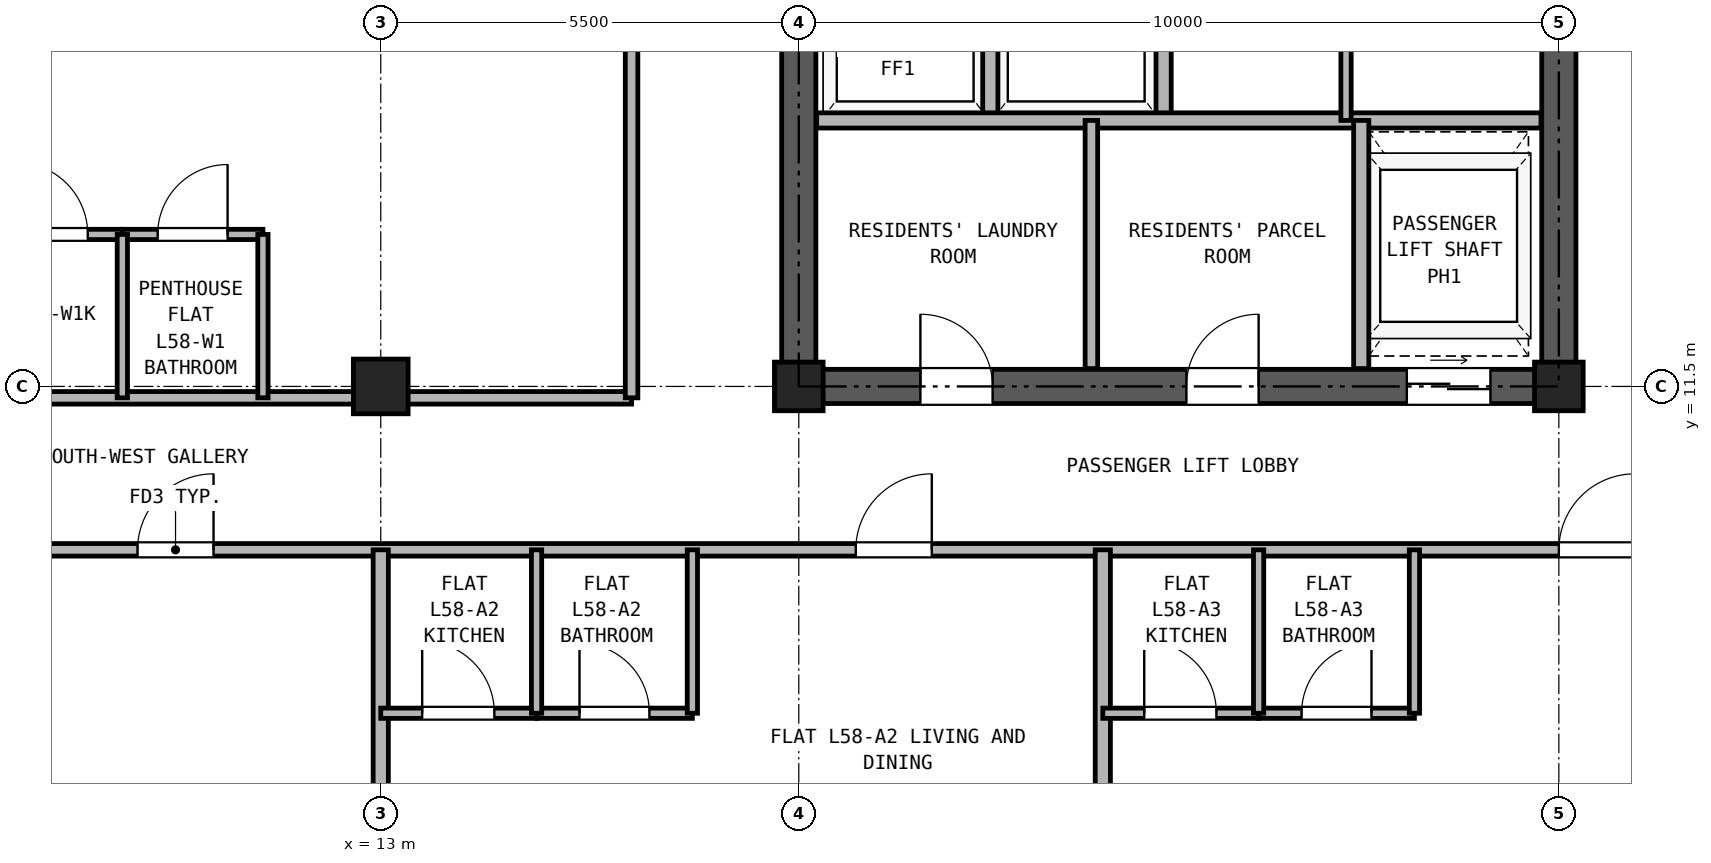
"""IFC4 building model, lengths in metres.
Left out: names, types, materials, properties, quantities, classifications, styles, units other than length and angle.
Written with IfcOpenShell. Run it as: python <this file> out.ifc"""

import sys

from ifc_helpers import new_model, si_unit, direction, frame, frame_2d, origin, origin_2d, place, context, subcontext, project, spatial, rectangle, hollow_rectangle, extrude, source, transform, mapped, element, fill, save


model = new_model("IFC4")
c1 = context("Model", 3, precision=1e-05, world=origin(), true_north=direction((0.0, 1.0)))
c2 = subcontext(c1, "Body", "Model", "MODEL_VIEW")
j1 = project(units=[si_unit("LENGTHUNIT", "METRE"), si_unit("PLANEANGLEUNIT", "RADIAN")], contexts=[c1])
p1 = place(None, origin())
s1 = spatial("IfcSite", under=j1, at=p1, CompositionType="ELEMENT")
p2 = place(p1, origin())
s2 = spatial("IfcBuilding", under=s1, at=p2, CompositionType="ELEMENT")
p3 = place(p2, frame((0.0, 0.0, 206.0)))
s3 = spatial("IfcBuildingStorey", under=s2, at=p3, CompositionType="ELEMENT", Elevation=206.0)
m1 = source(origin(), c2, "Body", "SweptSolid", [
    extrude(hollow_rectangle(XDim=0.72, YDim=0.72, WallThickness=0.04, at=origin_2d()), origin(), (0.0, 0.0, 1.0), 2.95),
])
p4 = place(p3, frame((13.0, 11.5, 0.0), z_axis=(0.0, 0.0, 1.0), x_axis=(1.0, 0.0, 0.0)))
e1 = element("IfcColumn", 1, at=p4, inside=s3, PredefinedType="COLUMN", context=c2, shape_type="MappedRepresentation", body=[
    mapped(m1, transform((0.0, 0.0, 0.0), x_axis=(1.0, 0.0, 0.0), y_axis=(0.0, 1.0, 0.0), z_axis=(0.0, 0.0, 1.0), scale=1.0)),
])
m2 = source(origin(), c2, "Body", "SweptSolid", [
    extrude(hollow_rectangle(XDim=0.64, YDim=0.64, WallThickness=0.035, at=origin_2d()), origin(), (0.0, 0.0, 1.0), 2.95),
])
for number, where, z_axis, x_axis in (
    (2, (18.5, 11.5, 0.0), (0.0, 0.0, 1.0), (1.0, 0.0, 0.0)),
    (3, (28.5, 11.5, 0.0), (0.0, 0.0, 1.0), (1.0, 0.0, 0.0)),
):
    element("IfcColumn", number, at=place(p3, frame(where, z_axis=z_axis, x_axis=x_axis)), inside=s3, PredefinedType="COLUMN", context=c2, shape_type="MappedRepresentation", body=[
        mapped(m2, transform((0.0, 0.0, 0.0), x_axis=(1.0, 0.0, 0.0), y_axis=(0.0, 1.0, 0.0), z_axis=(0.0, 0.0, 1.0), scale=1.0)),
    ])
p5 = place(p3, frame((18.275, 11.5, 0.0), z_axis=(0.0, 0.0, 1.0), x_axis=(1.0, 0.0, 0.0)))
e4 = element("IfcWall", 4, at=p5, inside=s3, PredefinedType="SHEAR", context=c2, shape_type="SweptSolid", body=[
    extrude(rectangle(XDim=10.45, YDim=0.45, at=frame_2d((5.225, 0.0))), origin(), (0.0, 0.0, 1.0), 2.95),
])
p6 = place(p5, frame((1.825, 0.0, 0.0)))
e5 = element("IfcOpeningElement", 5, at=p6, cuts=e4, PredefinedType="OPENING", context=c2, shape_type="SweptSolid", body=[
    extrude(rectangle(XDim=0.95, YDim=2.15, at=frame_2d((0.475, 1.075))), frame((0.0, 0.235, 0.0), z_axis=(0.0, -1.0, 0.0), x_axis=(1.0, 0.0, 0.0)), (0.0, 0.0, 1.0), 0.47),
])
p7 = place(p5, frame((5.325, 0.0, 0.0)))
e6 = element("IfcOpeningElement", 6, at=p7, cuts=e4, PredefinedType="OPENING", context=c2, shape_type="SweptSolid", body=[
    extrude(rectangle(XDim=0.95, YDim=2.15, at=frame_2d((0.475, 1.075))), frame((0.0, 0.235, 0.0), z_axis=(0.0, -1.0, 0.0), x_axis=(1.0, 0.0, 0.0)), (0.0, 0.0, 1.0), 0.47),
])
p8 = place(p5, frame((8.225, 0.0, 0.0)))
e7 = element("IfcOpeningElement", 7, at=p8, cuts=e4, PredefinedType="OPENING", context=c2, shape_type="SweptSolid", body=[
    extrude(rectangle(XDim=1.1, YDim=2.25, at=frame_2d((0.55, 1.125))), frame((0.0, 0.235, 0.0), z_axis=(0.0, -1.0, 0.0), x_axis=(1.0, 0.0, 0.0)), (0.0, 0.0, 1.0), 0.47),
])
p9 = place(p3, frame((18.5, 11.725, 0.0), z_axis=(0.0, 0.0, 1.0), x_axis=(0.0, 1.0, 0.0)))
e8 = element("IfcWall", 8, at=p9, inside=s3, PredefinedType="SHEAR", context=c2, shape_type="SweptSolid", body=[
    extrude(rectangle(XDim=16.8, YDim=0.45, at=frame_2d((8.4, 0.0))), origin(), (0.0, 0.0, 1.0), 2.95),
])
p10 = place(p9, frame((7.425, 0.0, 0.0)))
e9 = element("IfcOpeningElement", 9, at=p10, cuts=e8, PredefinedType="OPENING", context=c2, shape_type="SweptSolid", body=[
    extrude(rectangle(XDim=1.15, YDim=2.2, at=frame_2d((0.575, 1.1))), frame((0.0, 0.235, 0.0), z_axis=(0.0, -1.0, 0.0), x_axis=(1.0, 0.0, 0.0)), (0.0, 0.0, 1.0), 0.47),
])
p11 = place(p3, frame((28.5, 11.725, 0.0), z_axis=(0.0, 0.0, 1.0), x_axis=(0.0, 1.0, 0.0)))
e10 = element("IfcWall", 10, at=p11, inside=s3, PredefinedType="SHEAR", context=c2, shape_type="SweptSolid", body=[
    extrude(rectangle(XDim=16.8, YDim=0.45, at=frame_2d((8.4, 0.0))), origin(), (0.0, 0.0, 1.0), 2.95),
])
p12 = place(p11, frame((7.425, 0.0, 0.0)))
e11 = element("IfcOpeningElement", 11, at=p12, cuts=e10, PredefinedType="OPENING", context=c2, shape_type="SweptSolid", body=[
    extrude(rectangle(XDim=1.15, YDim=2.2, at=frame_2d((0.575, 1.1))), frame((0.0, 0.235, 0.0), z_axis=(0.0, -1.0, 0.0), x_axis=(1.0, 0.0, 0.0)), (0.0, 0.0, 1.0), 0.47),
])
for number, where, z_axis, x_axis in (
    (12, (21.02, 15.0, 0.0), (0.0, 0.0, 1.0), (0.0, 1.0, 0.0)),
    (13, (23.3, 15.0, 0.0), (0.0, 0.0, 1.0), (0.0, 1.0, 0.0)),
):
    element("IfcWall", number, at=place(p3, frame(where, z_axis=z_axis, x_axis=x_axis)), inside=s3, PredefinedType="PARTITIONING", context=c2, shape_type="SweptSolid", body=[
        extrude(rectangle(XDim=3.0, YDim=0.2, at=frame_2d((1.5, 0.0))), origin(), (0.0, 0.0, 1.0), 2.95),
    ])
p13 = place(p3, frame((18.735, 15.0, 0.0), z_axis=(0.0, 0.0, 1.0), x_axis=(1.0, 0.0, 0.0)))
e14 = element("IfcWall", 14, at=p13, inside=s3, PredefinedType="PARTITIONING", context=c2, shape_type="SweptSolid", body=[
    extrude(rectangle(XDim=9.53, YDim=0.2, at=frame_2d((4.765, 0.0))), origin(), (0.0, 0.0, 1.0), 2.95),
])
p14 = place(p3, frame((25.7, 15.0, 0.0), z_axis=(0.0, 0.0, 1.0), x_axis=(0.0, 1.0, 0.0)))
e15 = element("IfcWall", 15, at=p14, inside=s3, PredefinedType="PARTITIONING", context=c2, shape_type="SweptSolid", body=[
    extrude(rectangle(XDim=3.0, YDim=0.135, at=frame_2d((1.5, 0.0))), origin(), (0.0, 0.0, 1.0), 2.95),
])
p15 = place(p3, frame((22.35, 11.735, 0.0), z_axis=(0.0, 0.0, 1.0), x_axis=(0.0, 1.0, 0.0)))
e16 = element("IfcWall", 16, at=p15, inside=s3, PredefinedType="PARTITIONING", context=c2, shape_type="SweptSolid", body=[
    extrude(rectangle(XDim=3.265, YDim=0.165, at=frame_2d((1.632, 0.0))), origin(), (0.0, 0.0, 1.0), 2.95),
])
p16 = place(p3, frame((25.9, 11.735, 0.0), z_axis=(0.0, 0.0, 1.0), x_axis=(0.0, 1.0, 0.0)))
e17 = element("IfcWall", 17, at=p16, inside=s3, PredefinedType="PARTITIONING", context=c2, shape_type="SweptSolid", body=[
    extrude(rectangle(XDim=3.265, YDim=0.2, at=frame_2d((1.632, 0.0))), origin(), (0.0, 0.0, 1.0), 2.95),
])
p17 = place(p3, frame((0.16, 9.35, 0.0), z_axis=(0.0, 0.0, 1.0), x_axis=(1.0, 0.0, 0.0)))
e18 = element("IfcWall", 18, at=p17, inside=s3, PredefinedType="PARTITIONING", context=c2, shape_type="SweptSolid", body=[
    extrude(rectangle(XDim=41.48, YDim=0.165, at=frame_2d((20.74, 0.0))), origin(), (0.0, 0.0, 1.0), 2.95),
])
p18 = place(p17, frame((9.64, 0.0, 0.0)))
e19 = element("IfcOpeningElement", 19, at=p18, cuts=e18, PredefinedType="OPENING", context=c2, shape_type="SweptSolid", body=[
    extrude(rectangle(XDim=1.0, YDim=2.15, at=frame_2d((0.5, 1.075))), frame((0.0, 0.093, 0.0), z_axis=(0.0, -1.0, 0.0), x_axis=(1.0, 0.0, 0.0)), (0.0, 0.0, 1.0), 0.185),
])
p19 = place(p17, frame((19.09, 0.0, 0.0)))
e20 = element("IfcOpeningElement", 20, at=p19, cuts=e18, PredefinedType="OPENING", context=c2, shape_type="SweptSolid", body=[
    extrude(rectangle(XDim=1.0, YDim=2.15, at=frame_2d((0.5, 1.075))), frame((0.0, 0.093, 0.0), z_axis=(0.0, -1.0, 0.0), x_axis=(1.0, 0.0, 0.0)), (0.0, 0.0, 1.0), 0.185),
])
p20 = place(p17, frame((28.34, 0.0, 0.0)))
e21 = element("IfcOpeningElement", 21, at=p20, cuts=e18, PredefinedType="OPENING", context=c2, shape_type="SweptSolid", body=[
    extrude(rectangle(XDim=1.0, YDim=2.15, at=frame_2d((0.5, 1.075))), frame((0.0, 0.093, 0.0), z_axis=(0.0, -1.0, 0.0), x_axis=(1.0, 0.0, 0.0)), (0.0, 0.0, 1.0), 0.185),
])
p21 = place(p17, frame((32.865, 0.0, 0.0)))
e22 = element("IfcOpeningElement", 22, at=p21, cuts=e18, PredefinedType="OPENING", context=c2, shape_type="SweptSolid", body=[
    extrude(rectangle(XDim=1.0, YDim=2.15, at=frame_2d((0.5, 1.075))), frame((0.0, 0.093, 0.0), z_axis=(0.0, -1.0, 0.0), x_axis=(1.0, 0.0, 0.0)), (0.0, 0.0, 1.0), 0.185),
])
p22 = place(p3, frame((7.6, 11.35, 0.0), z_axis=(0.0, 0.0, 1.0), x_axis=(1.0, 0.0, 0.0)))
e23 = element("IfcWall", 23, at=p22, inside=s3, PredefinedType="PARTITIONING", context=c2, shape_type="SweptSolid", body=[
    extrude(rectangle(XDim=8.7, YDim=0.165, at=frame_2d((4.35, 0.0))), origin(), (0.0, 0.0, 1.0), 2.323),
])
p23 = place(p3, frame((16.3, 11.35, 0.0), z_axis=(0.0, 0.0, 1.0), x_axis=(0.0, 1.0, 0.0)))
e24 = element("IfcWall", 24, at=p23, inside=s3, PredefinedType="PARTITIONING", context=c2, shape_type="SweptSolid", body=[
    extrude(rectangle(XDim=23.79, YDim=0.165, at=frame_2d((11.895, 0.0))), origin(), (0.0, 0.0, 1.0), 2.95),
])
p24 = place(p23, frame((4.825, 0.0, 0.0)))
e25 = element("IfcOpeningElement", 25, at=p24, cuts=e24, PredefinedType="OPENING", context=c2, shape_type="SweptSolid", body=[
    extrude(rectangle(XDim=1.0, YDim=2.15, at=frame_2d((0.5, 1.075))), frame((0.0, 0.093, 0.0), z_axis=(0.0, -1.0, 0.0), x_axis=(1.0, 0.0, 0.0)), (0.0, 0.0, 1.0), 0.185),
])
p25 = place(p23, frame((14.475, 0.0, 0.0)))
e26 = element("IfcOpeningElement", 26, at=p25, cuts=e24, PredefinedType="OPENING", context=c2, shape_type="SweptSolid", body=[
    extrude(rectangle(XDim=1.0, YDim=2.15, at=frame_2d((0.5, 1.075))), frame((0.0, 0.093, 0.0), z_axis=(0.0, -1.0, 0.0), x_axis=(1.0, 0.0, 0.0)), (0.0, 0.0, 1.0), 0.185),
])
p26 = place(p3, frame((13.0, 0.16, 0.0), z_axis=(0.0, 0.0, 1.0), x_axis=(0.0, 1.0, 0.0)))
e27 = element("IfcWall", 27, at=p26, inside=s3, PredefinedType="PARTITIONING", context=c2, shape_type="SweptSolid", body=[
    extrude(rectangle(XDim=9.19, YDim=0.2, at=frame_2d((4.595, 0.0))), origin(), (0.0, 0.0, 1.0), 2.323),
])
p27 = place(p3, frame((13.0, 7.2, 0.0), z_axis=(0.0, 0.0, 1.0), x_axis=(1.0, 0.0, 0.0)))
e28 = element("IfcWall", 28, at=p27, inside=s3, PredefinedType="PARTITIONING", context=c2, shape_type="SweptSolid", body=[
    extrude(rectangle(XDim=2.05, YDim=0.135, at=frame_2d((1.025, 0.0))), origin(), (0.0, 0.0, 1.0), 2.95),
])
p28 = place(p27, frame((0.545, 0.0, 0.0)))
e29 = element("IfcOpeningElement", 29, at=p28, cuts=e28, PredefinedType="OPENING", context=c2, shape_type="SweptSolid", body=[
    extrude(rectangle(XDim=0.95, YDim=2.15, at=frame_2d((0.475, 1.075))), frame((0.0, 0.077, 0.0), z_axis=(0.0, -1.0, 0.0), x_axis=(1.0, 0.0, 0.0)), (0.0, 0.0, 1.0), 0.155),
])
p29 = place(p3, frame((15.05, 7.2, 0.0), z_axis=(0.0, 0.0, 1.0), x_axis=(1.0, 0.0, 0.0)))
e30 = element("IfcWall", 30, at=p29, inside=s3, PredefinedType="PARTITIONING", context=c2, shape_type="SweptSolid", body=[
    extrude(rectangle(XDim=2.05, YDim=0.135, at=frame_2d((1.025, 0.0))), origin(), (0.0, 0.0, 1.0), 2.95),
])
p30 = place(p29, frame((0.565, 0.0, 0.0)))
e31 = element("IfcOpeningElement", 31, at=p30, cuts=e30, PredefinedType="OPENING", context=c2, shape_type="SweptSolid", body=[
    extrude(rectangle(XDim=0.92, YDim=2.1, at=frame_2d((0.46, 1.05))), frame((0.0, 0.077, 0.0), z_axis=(0.0, -1.0, 0.0), x_axis=(1.0, 0.0, 0.0)), (0.0, 0.0, 1.0), 0.155),
])
for number, where, z_axis, x_axis in (
    (32, (15.05, 7.2, 0.0), (0.0, 0.0, 1.0), (0.0, 1.0, 0.0)),
    (33, (17.1, 7.2, 0.0), (0.0, 0.0, 1.0), (0.0, 1.0, 0.0)),
):
    element("IfcWall", number, at=place(p3, frame(where, z_axis=z_axis, x_axis=x_axis)), inside=s3, PredefinedType="PARTITIONING", context=c2, shape_type="SweptSolid", body=[
        extrude(rectangle(XDim=2.15, YDim=0.135, at=frame_2d((1.075, 0.0))), origin(), (0.0, 0.0, 1.0), 2.95),
    ])
p31 = place(p3, frame((22.5, 0.16, 0.0), z_axis=(0.0, 0.0, 1.0), x_axis=(0.0, 1.0, 0.0)))
e34 = element("IfcWall", 34, at=p31, inside=s3, PredefinedType="PARTITIONING", context=c2, shape_type="SweptSolid", body=[
    extrude(rectangle(XDim=9.19, YDim=0.2, at=frame_2d((4.595, 0.0))), origin(), (0.0, 0.0, 1.0), 2.95),
])
p32 = place(p3, frame((22.5, 7.2, 0.0), z_axis=(0.0, 0.0, 1.0), x_axis=(1.0, 0.0, 0.0)))
e35 = element("IfcWall", 35, at=p32, inside=s3, PredefinedType="PARTITIONING", context=c2, shape_type="SweptSolid", body=[
    extrude(rectangle(XDim=2.05, YDim=0.135, at=frame_2d((1.025, 0.0))), origin(), (0.0, 0.0, 1.0), 2.95),
])
p33 = place(p32, frame((0.545, 0.0, 0.0)))
e36 = element("IfcOpeningElement", 36, at=p33, cuts=e35, PredefinedType="OPENING", context=c2, shape_type="SweptSolid", body=[
    extrude(rectangle(XDim=0.95, YDim=2.15, at=frame_2d((0.475, 1.075))), frame((0.0, 0.077, 0.0), z_axis=(0.0, -1.0, 0.0), x_axis=(1.0, 0.0, 0.0)), (0.0, 0.0, 1.0), 0.155),
])
p34 = place(p3, frame((24.55, 7.2, 0.0), z_axis=(0.0, 0.0, 1.0), x_axis=(1.0, 0.0, 0.0)))
e37 = element("IfcWall", 37, at=p34, inside=s3, PredefinedType="PARTITIONING", context=c2, shape_type="SweptSolid", body=[
    extrude(rectangle(XDim=2.05, YDim=0.135, at=frame_2d((1.025, 0.0))), origin(), (0.0, 0.0, 1.0), 2.95),
])
p35 = place(p34, frame((0.565, 0.0, 0.0)))
e38 = element("IfcOpeningElement", 38, at=p35, cuts=e37, PredefinedType="OPENING", context=c2, shape_type="SweptSolid", body=[
    extrude(rectangle(XDim=0.92, YDim=2.1, at=frame_2d((0.46, 1.05))), frame((0.0, 0.077, 0.0), z_axis=(0.0, -1.0, 0.0), x_axis=(1.0, 0.0, 0.0)), (0.0, 0.0, 1.0), 0.155),
])
for number, where, z_axis, x_axis in (
    (39, (24.55, 7.2, 0.0), (0.0, 0.0, 1.0), (0.0, 1.0, 0.0)),
    (40, (26.6, 7.2, 0.0), (0.0, 0.0, 1.0), (0.0, 1.0, 0.0)),
):
    element("IfcWall", number, at=place(p3, frame(where, z_axis=z_axis, x_axis=x_axis)), inside=s3, PredefinedType="PARTITIONING", context=c2, shape_type="SweptSolid", body=[
        extrude(rectangle(XDim=2.15, YDim=0.135, at=frame_2d((1.075, 0.0))), origin(), (0.0, 0.0, 1.0), 2.95),
    ])
p36 = place(p3, frame((7.75, 13.5, 0.0), z_axis=(0.0, 0.0, 1.0), x_axis=(1.0, 0.0, 0.0)))
e41 = element("IfcWall", 41, at=p36, inside=s3, PredefinedType="PARTITIONING", context=c2, shape_type="SweptSolid", body=[
    extrude(rectangle(XDim=1.85, YDim=0.135, at=frame_2d((0.925, 0.0))), origin(), (0.0, 0.0, 1.0), 2.95),
])
p37 = place(p36, frame((0.445, 0.0, 0.0)))
e42 = element("IfcOpeningElement", 42, at=p37, cuts=e41, PredefinedType="OPENING", context=c2, shape_type="SweptSolid", body=[
    extrude(rectangle(XDim=0.95, YDim=2.15, at=frame_2d((0.475, 1.075))), frame((0.0, 0.077, 0.0), z_axis=(0.0, -1.0, 0.0), x_axis=(1.0, 0.0, 0.0)), (0.0, 0.0, 1.0), 0.155),
])
p38 = place(p3, frame((9.6, 13.5, 0.0), z_axis=(0.0, 0.0, 1.0), x_axis=(1.0, 0.0, 0.0)))
e43 = element("IfcWall", 43, at=p38, inside=s3, PredefinedType="PARTITIONING", context=c2, shape_type="SweptSolid", body=[
    extrude(rectangle(XDim=1.85, YDim=0.135, at=frame_2d((0.925, 0.0))), origin(), (0.0, 0.0, 1.0), 2.95),
])
p39 = place(p38, frame((0.465, 0.0, 0.0)))
e44 = element("IfcOpeningElement", 44, at=p39, cuts=e43, PredefinedType="OPENING", context=c2, shape_type="SweptSolid", body=[
    extrude(rectangle(XDim=0.92, YDim=2.1, at=frame_2d((0.46, 1.05))), frame((0.0, 0.077, 0.0), z_axis=(0.0, -1.0, 0.0), x_axis=(1.0, 0.0, 0.0)), (0.0, 0.0, 1.0), 0.155),
])
for number, where, z_axis, x_axis in (
    (45, (9.6, 11.35, 0.0), (0.0, 0.0, 1.0), (0.0, 1.0, 0.0)),
    (46, (11.45, 11.35, 0.0), (0.0, 0.0, 1.0), (0.0, 1.0, 0.0)),
):
    element("IfcWall", number, at=place(p3, frame(where, z_axis=z_axis, x_axis=x_axis)), inside=s3, PredefinedType="PARTITIONING", context=c2, shape_type="SweptSolid", body=[
        extrude(rectangle(XDim=2.15, YDim=0.135, at=frame_2d((1.075, 0.0))), origin(), (0.0, 0.0, 1.0), 2.95),
    ])
p40 = place(p6, frame((0.95, 0.0, 0.0), z_axis=(0.0, 0.0, 1.0), x_axis=(-1.0, 0.0, 0.0)))
e47 = element("IfcDoor", 47, at=p40, inside=s3, OperationType="SINGLE_SWING_LEFT", PredefinedType="DOOR", context=c2, shape_type="SweptSolid", body=[
    extrude(rectangle(XDim=0.95, YDim=2.15, at=frame_2d((0.475, 1.075))), frame((0.0, 0.025, 0.0), z_axis=(0.0, -1.0, 0.0), x_axis=(1.0, 0.0, 0.0)), (0.0, 0.0, 1.0), 0.05),
])
fill(e5, e47)
p41 = place(p7, frame((0.95, 0.0, 0.0), z_axis=(0.0, 0.0, 1.0), x_axis=(-1.0, 0.0, 0.0)))
e48 = element("IfcDoor", 48, at=p41, inside=s3, OperationType="SINGLE_SWING_RIGHT", PredefinedType="DOOR", context=c2, shape_type="SweptSolid", body=[
    extrude(rectangle(XDim=0.95, YDim=2.15, at=frame_2d((0.475, 1.075))), frame((0.0, 0.025, 0.0), z_axis=(0.0, -1.0, 0.0), x_axis=(1.0, 0.0, 0.0)), (0.0, 0.0, 1.0), 0.05),
])
fill(e6, e48)
p42 = place(p8, frame((1.1, 0.0, 0.0), z_axis=(0.0, 0.0, 1.0), x_axis=(-1.0, 0.0, 0.0)))
e49 = element("IfcDoor", 49, at=p42, inside=s3, OperationType="DOUBLE_DOOR_SLIDING", PredefinedType="DOOR", context=c2, shape_type="SweptSolid", body=[
    extrude(rectangle(XDim=1.1, YDim=2.25, at=frame_2d((0.55, 1.125))), frame((0.0, 0.025, 0.0), z_axis=(0.0, -1.0, 0.0), x_axis=(1.0, 0.0, 0.0)), (0.0, 0.0, 1.0), 0.05),
])
fill(e7, e49)
p43 = place(p18, frame((1.0, 0.0, 0.0), z_axis=(0.0, 0.0, 1.0), x_axis=(-1.0, 0.0, 0.0)))
e50 = element("IfcDoor", 50, at=p43, inside=s3, OperationType="SINGLE_SWING_RIGHT", PredefinedType="DOOR", context=c2, shape_type="SweptSolid", body=[
    extrude(rectangle(XDim=1.0, YDim=2.15, at=frame_2d((0.5, 1.075))), frame((0.0, 0.025, 0.0), z_axis=(0.0, -1.0, 0.0), x_axis=(1.0, 0.0, 0.0)), (0.0, 0.0, 1.0), 0.05),
])
fill(e19, e50)
p44 = place(p28, origin())
e51 = element("IfcDoor", 51, at=p44, inside=s3, OperationType="SINGLE_SWING_LEFT", PredefinedType="DOOR", context=c2, shape_type="SweptSolid", body=[
    extrude(rectangle(XDim=0.95, YDim=2.15, at=frame_2d((0.475, 1.075))), frame((0.0, 0.025, 0.0), z_axis=(0.0, -1.0, 0.0), x_axis=(1.0, 0.0, 0.0)), (0.0, 0.0, 1.0), 0.05),
])
fill(e29, e51)
p45 = place(p30, origin())
e52 = element("IfcDoor", 52, at=p45, inside=s3, OperationType="SINGLE_SWING_LEFT", PredefinedType="DOOR", context=c2, shape_type="SweptSolid", body=[
    extrude(rectangle(XDim=0.92, YDim=2.1, at=frame_2d((0.46, 1.05))), frame((0.0, 0.025, 0.0), z_axis=(0.0, -1.0, 0.0), x_axis=(1.0, 0.0, 0.0)), (0.0, 0.0, 1.0), 0.05),
])
fill(e31, e52)
p46 = place(p19, frame((1.0, 0.0, 0.0), z_axis=(0.0, 0.0, 1.0), x_axis=(-1.0, 0.0, 0.0)))
e53 = element("IfcDoor", 53, at=p46, inside=s3, OperationType="SINGLE_SWING_RIGHT", PredefinedType="DOOR", context=c2, shape_type="SweptSolid", body=[
    extrude(rectangle(XDim=1.0, YDim=2.15, at=frame_2d((0.5, 1.075))), frame((0.0, 0.025, 0.0), z_axis=(0.0, -1.0, 0.0), x_axis=(1.0, 0.0, 0.0)), (0.0, 0.0, 1.0), 0.05),
])
fill(e20, e53)
p47 = place(p33, origin())
e54 = element("IfcDoor", 54, at=p47, inside=s3, OperationType="SINGLE_SWING_LEFT", PredefinedType="DOOR", context=c2, shape_type="SweptSolid", body=[
    extrude(rectangle(XDim=0.95, YDim=2.15, at=frame_2d((0.475, 1.075))), frame((0.0, 0.025, 0.0), z_axis=(0.0, -1.0, 0.0), x_axis=(1.0, 0.0, 0.0)), (0.0, 0.0, 1.0), 0.05),
])
fill(e36, e54)
p48 = place(p35, origin())
e55 = element("IfcDoor", 55, at=p48, inside=s3, OperationType="SINGLE_SWING_RIGHT", PredefinedType="DOOR", context=c2, shape_type="SweptSolid", body=[
    extrude(rectangle(XDim=0.92, YDim=2.1, at=frame_2d((0.46, 1.05))), frame((0.0, 0.025, 0.0), z_axis=(0.0, -1.0, 0.0), x_axis=(1.0, 0.0, 0.0)), (0.0, 0.0, 1.0), 0.05),
])
fill(e38, e55)
p49 = place(p20, frame((1.0, 0.0, 0.0), z_axis=(0.0, 0.0, 1.0), x_axis=(-1.0, 0.0, 0.0)))
e56 = element("IfcDoor", 56, at=p49, inside=s3, OperationType="SINGLE_SWING_RIGHT", PredefinedType="DOOR", context=c2, shape_type="SweptSolid", body=[
    extrude(rectangle(XDim=1.0, YDim=2.15, at=frame_2d((0.5, 1.075))), frame((0.0, 0.025, 0.0), z_axis=(0.0, -1.0, 0.0), x_axis=(1.0, 0.0, 0.0)), (0.0, 0.0, 1.0), 0.05),
])
fill(e21, e56)
p50 = place(p37, origin())
e57 = element("IfcDoor", 57, at=p50, inside=s3, OperationType="SINGLE_SWING_LEFT", PredefinedType="DOOR", context=c2, shape_type="SweptSolid", body=[
    extrude(rectangle(XDim=0.95, YDim=2.15, at=frame_2d((0.475, 1.075))), frame((0.0, 0.025, 0.0), z_axis=(0.0, -1.0, 0.0), x_axis=(1.0, 0.0, 0.0)), (0.0, 0.0, 1.0), 0.05),
])
fill(e42, e57)
p51 = place(p39, origin())
e58 = element("IfcDoor", 58, at=p51, inside=s3, OperationType="SINGLE_SWING_RIGHT", PredefinedType="DOOR", context=c2, shape_type="SweptSolid", body=[
    extrude(rectangle(XDim=0.92, YDim=2.1, at=frame_2d((0.46, 1.05))), frame((0.0, 0.025, 0.0), z_axis=(0.0, -1.0, 0.0), x_axis=(1.0, 0.0, 0.0)), (0.0, 0.0, 1.0), 0.05),
])
fill(e44, e58)
save(model, sys.argv[1])
